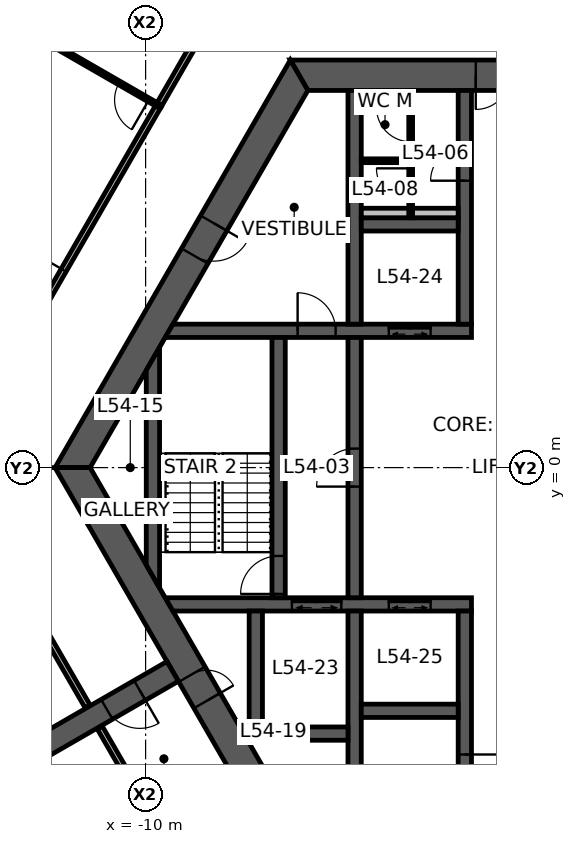
"""IFC4 building model, lengths in metres.
Left out: names, types, materials, properties, quantities, classifications, styles, units other than length and angle.
Written with IfcOpenShell. Run it as: python <this file> out.ifc"""

import sys

from ifc_helpers import new_model, si_unit, direction, frame, frame_2d, origin, place, context, subcontext, project, spatial, polyline, rectangle, outline, extrude, element, fill, save


model = new_model("IFC4")
c1 = context("Model", 3, precision=1e-05, world=origin(), true_north=direction((0.0, 1.0)))
c2 = subcontext(c1, "Body", "Model", "MODEL_VIEW")
j1 = project(units=[si_unit("LENGTHUNIT", "METRE"), si_unit("PLANEANGLEUNIT", "RADIAN")], contexts=[c1])
p1 = place(None, origin())
s1 = spatial("IfcSite", under=j1, at=p1, CompositionType="ELEMENT")
p2 = place(p1, origin())
s2 = spatial("IfcBuilding", under=s1, at=p2, CompositionType="ELEMENT")
p3 = place(p2, frame((0.0, 0.0, 216.7)))
s3 = spatial("IfcBuildingStorey", under=s2, at=p3, CompositionType="ELEMENT", Elevation=216.7)
p4 = place(p3, frame((5.961, 10.325, 0.0), z_axis=(0.0, 0.0, 1.0), x_axis=(-1.0, 0.0, 0.0)))
e1 = element("IfcWall", 1, at=p4, inside=s3, PredefinedType="SHEAR", context=c2, shape_type="SweptSolid", body=[
    extrude(outline(polyline([(-0.231, -0.4), (4.649, -0.4), (5.549, -0.4), (6.374, -0.4), (7.273, -0.4), (12.153, -0.4), (11.691, 0.4), (7.273, 0.4), (6.374, 0.4), (5.549, 0.4), (4.649, 0.4), (0.231, 0.4), (-0.231, -0.4)])), origin(), (0.0, 0.0, 1.0), 3.9),
])
p5 = place(p4, frame((6.374, 0.0, 0.0)))
e2 = element("IfcOpeningElement", 2, at=p5, cuts=e1, PredefinedType="OPENING", context=c2, shape_type="SweptSolid", body=[
    extrude(rectangle(XDim=0.9, YDim=2.1, at=frame_2d((0.45, 1.05))), frame((0.0, 0.41, 0.0), z_axis=(0.0, -1.0, 0.0), x_axis=(1.0, 0.0, 0.0)), (0.0, 0.0, 1.0), 0.82),
])
p6 = place(p4, frame((4.649, 0.0, 0.0)))
e3 = element("IfcOpeningElement", 3, at=p6, cuts=e1, PredefinedType="OPENING", context=c2, shape_type="SweptSolid", body=[
    extrude(rectangle(XDim=0.9, YDim=2.1, at=frame_2d((0.45, 1.05))), frame((0.0, 0.41, 0.0), z_axis=(0.0, -1.0, 0.0), x_axis=(1.0, 0.0, 0.0)), (0.0, 0.0, 1.0), 0.82),
])
p7 = place(p3, frame((-5.961, 10.325, 0.0), z_axis=(0.0, 0.0, 1.0), x_axis=(-0.500004296715, -0.866022923061, 0.0)))
e4 = element("IfcWall", 4, at=p7, inside=s3, PredefinedType="SHEAR", context=c2, shape_type="SweptSolid", body=[
    extrude(outline(polyline([(-0.231, -0.4), (4.494, -0.4), (5.494, -0.4), (12.153, -0.4), (11.691, 0.4), (5.494, 0.4), (4.494, 0.4), (0.231, 0.4), (-0.231, -0.4)])), origin(), (0.0, 0.0, 1.0), 3.9),
])
p8 = place(p7, frame((4.494, 0.0, 0.0)))
e5 = element("IfcOpeningElement", 5, at=p8, cuts=e4, PredefinedType="OPENING", context=c2, shape_type="SweptSolid", body=[
    extrude(rectangle(XDim=1.0, YDim=2.1, at=frame_2d((0.5, 1.05))), frame((0.0, 0.41, 0.0), z_axis=(0.0, -1.0, 0.0), x_axis=(1.0, 0.0, 0.0)), (0.0, 0.0, 1.0), 0.82),
])
p9 = place(p3, frame((-11.922, 0.0, 0.0), z_axis=(0.0, 0.0, 1.0), x_axis=(0.500004296715, -0.866022923061, 0.0)))
e6 = element("IfcWall", 6, at=p9, inside=s3, PredefinedType="SHEAR", context=c2, shape_type="SweptSolid", body=[
    extrude(outline(polyline([(-0.231, -0.4), (6.281, -0.4), (7.081, -0.4), (12.153, -0.4), (11.691, 0.4), (7.081, 0.4), (6.281, 0.4), (0.231, 0.4), (-0.231, -0.4)])), origin(), (0.0, 0.0, 1.0), 3.9),
])
p10 = place(p9, frame((6.281, 0.0, 0.0)))
e7 = element("IfcOpeningElement", 7, at=p10, cuts=e6, PredefinedType="OPENING", context=c2, shape_type="SweptSolid", body=[
    extrude(rectangle(XDim=0.8, YDim=2.1, at=frame_2d((0.4, 1.05))), frame((0.0, 0.41, 0.0), z_axis=(0.0, -1.0, 0.0), x_axis=(1.0, 0.0, 0.0)), (0.0, 0.0, 1.0), 0.82),
])
p11 = place(p3, frame((-9.288, -5.363, 0.0), z_axis=(0.0, 0.0, 1.0), x_axis=(-0.866027473358, -0.499996415376, 0.0)))
e8 = element("IfcWall", 8, at=p11, inside=s3, PredefinedType="SHEAR", context=c2, shape_type="SweptSolid", body=[
    extrude(rectangle(XDim=7.045, YDim=0.6, at=frame_2d((3.523, 0.0))), origin(), (0.0, 0.0, 1.0), 3.9),
])
p12 = place(p11, frame((1.0, 0.0, 0.0)))
e9 = element("IfcOpeningElement", 9, at=p12, cuts=e8, PredefinedType="OPENING", context=c2, shape_type="SweptSolid", body=[
    extrude(rectangle(XDim=1.0, YDim=2.1, at=frame_2d((0.5, 1.05))), frame((0.0, 0.31, 0.0), z_axis=(0.0, -1.0, 0.0), x_axis=(1.0, 0.0, 0.0)), (0.0, 0.0, 1.0), 0.62),
])
p13 = place(p3, frame((-9.382, 3.6, 0.0), z_axis=(0.0, 0.0, 1.0), x_axis=(1.0, 0.0, 0.0)))
e10 = element("IfcWall", 10, at=p13, inside=s3, PredefinedType="SHEAR", context=c2, shape_type="SweptSolid", body=[
    extrude(outline(polyline([(-0.101, -0.175), (3.382, -0.175), (4.382, -0.175), (5.782, -0.175), (6.882, -0.175), (7.957, -0.175), (7.957, 0.175), (6.882, 0.175), (5.782, 0.175), (4.382, 0.175), (3.382, 0.175), (0.101, 0.175), (-0.101, -0.175)])), origin(), (0.0, 0.0, 1.0), 3.9),
])
p14 = place(p13, frame((3.382, 0.0, 0.0)))
e11 = element("IfcOpeningElement", 11, at=p14, cuts=e10, PredefinedType="OPENING", context=c2, shape_type="SweptSolid", body=[
    extrude(rectangle(XDim=1.0, YDim=2.1, at=frame_2d((0.5, 1.05))), frame((0.0, 0.185, 0.0), z_axis=(0.0, -1.0, 0.0), x_axis=(1.0, 0.0, 0.0)), (0.0, 0.0, 1.0), 0.37),
])
p15 = place(p13, frame((5.782, 0.0, 0.0)))
e12 = element("IfcOpeningElement", 12, at=p15, cuts=e10, PredefinedType="OPENING", context=c2, shape_type="SweptSolid", body=[
    extrude(rectangle(XDim=1.1, YDim=2.1, at=frame_2d((0.55, 1.05))), frame((0.0, 0.185, 0.0), z_axis=(0.0, -1.0, 0.0), x_axis=(1.0, 0.0, 0.0)), (0.0, 0.0, 1.0), 0.37),
])
p16 = place(p3, frame((-9.382, -3.6, 0.0), z_axis=(0.0, 0.0, 1.0), x_axis=(1.0, 0.0, 0.0)))
e13 = element("IfcWall", 13, at=p16, inside=s3, PredefinedType="SHEAR", context=c2, shape_type="SweptSolid", body=[
    extrude(outline(polyline([(0.101, -0.175), (3.232, -0.175), (4.532, -0.175), (5.782, -0.175), (6.882, -0.175), (7.957, -0.175), (7.957, 0.175), (6.882, 0.175), (5.782, 0.175), (4.532, 0.175), (3.232, 0.175), (-0.101, 0.175), (0.101, -0.175)])), origin(), (0.0, 0.0, 1.0), 3.9),
])
p17 = place(p16, frame((5.782, 0.0, 0.0)))
e14 = element("IfcOpeningElement", 14, at=p17, cuts=e13, PredefinedType="OPENING", context=c2, shape_type="SweptSolid", body=[
    extrude(rectangle(XDim=1.1, YDim=2.1, at=frame_2d((0.55, 1.05))), frame((0.0, 0.185, 0.0), z_axis=(0.0, -1.0, 0.0), x_axis=(1.0, 0.0, 0.0)), (0.0, 0.0, 1.0), 0.37),
])
p18 = place(p16, frame((3.232, 0.0, 0.0)))
e15 = element("IfcOpeningElement", 15, at=p18, cuts=e13, PredefinedType="OPENING", context=c2, shape_type="SweptSolid", body=[
    extrude(rectangle(XDim=1.3, YDim=2.1, at=frame_2d((0.65, 1.05))), frame((0.0, 0.185, 0.0), z_axis=(0.0, -1.0, 0.0), x_axis=(1.0, 0.0, 0.0)), (0.0, 0.0, 1.0), 0.37),
])
p19 = place(p3, frame((-1.6, 3.775, 0.0), z_axis=(0.0, 0.0, 1.0), x_axis=(0.0, 1.0, 0.0)))
e16 = element("IfcWall", 16, at=p19, inside=s3, PredefinedType="SHEAR", context=c2, shape_type="SweptSolid", body=[
    extrude(rectangle(XDim=6.15, YDim=0.35, at=frame_2d((3.075, 0.0))), origin(), (0.0, 0.0, 1.0), 3.9),
])
p20 = place(p19, frame((3.775, 0.0, 0.0)))
e17 = element("IfcOpeningElement", 17, at=p20, cuts=e16, PredefinedType="OPENING", context=c2, shape_type="SweptSolid", body=[
    extrude(rectangle(XDim=0.9, YDim=2.1, at=frame_2d((0.45, 1.05))), frame((0.0, 0.185, 0.0), z_axis=(0.0, -1.0, 0.0), x_axis=(1.0, 0.0, 0.0)), (0.0, 0.0, 1.0), 0.37),
])
p21 = place(p3, frame((-1.6, -3.775, 0.0), z_axis=(0.0, 0.0, 1.0), x_axis=(0.0, -1.0, 0.0)))
e18 = element("IfcWall", 18, at=p21, inside=s3, PredefinedType="SHEAR", context=c2, shape_type="SweptSolid", body=[
    extrude(rectangle(XDim=6.15, YDim=0.35, at=frame_2d((3.075, 0.0))), origin(), (0.0, 0.0, 1.0), 3.9),
])
p22 = place(p21, frame((3.775, 0.0, 0.0)))
e19 = element("IfcOpeningElement", 19, at=p22, cuts=e18, PredefinedType="OPENING", context=c2, shape_type="SweptSolid", body=[
    extrude(rectangle(XDim=0.9, YDim=2.1, at=frame_2d((0.45, 1.05))), frame((0.0, 0.185, 0.0), z_axis=(0.0, -1.0, 0.0), x_axis=(1.0, 0.0, 0.0)), (0.0, 0.0, 1.0), 0.37),
])
p23 = place(p3, frame((-4.5, -3.425, 0.0), z_axis=(0.0, 0.0, 1.0), x_axis=(0.0, 1.0, 0.0)))
e20 = element("IfcWall", 20, at=p23, inside=s3, PredefinedType="SHEAR", context=c2, shape_type="SweptSolid", body=[
    extrude(rectangle(XDim=6.85, YDim=0.35, at=frame_2d((3.425, 0.0))), origin(), (0.0, 0.0, 1.0), 3.9),
])
p24 = place(p23, frame((2.925, 0.0, 0.0)))
e21 = element("IfcOpeningElement", 21, at=p24, cuts=e20, PredefinedType="OPENING", context=c2, shape_type="SweptSolid", body=[
    extrude(rectangle(XDim=1.0, YDim=2.1, at=frame_2d((0.5, 1.05))), frame((0.0, 0.185, 0.0), z_axis=(0.0, -1.0, 0.0), x_axis=(1.0, 0.0, 0.0)), (0.0, 0.0, 1.0), 0.37),
])
p25 = place(p3, frame((-6.5, -3.425, 0.0), z_axis=(0.0, 0.0, 1.0), x_axis=(0.0, 1.0, 0.0)))
e22 = element("IfcWall", 22, at=p25, inside=s3, PredefinedType="SHEAR", context=c2, shape_type="SweptSolid", body=[
    extrude(rectangle(XDim=6.85, YDim=0.35, at=frame_2d((3.425, 0.0))), origin(), (0.0, 0.0, 1.0), 3.9),
])
p26 = place(p25, frame((0.1, 0.0, 0.0)))
e23 = element("IfcOpeningElement", 23, at=p26, cuts=e22, PredefinedType="OPENING", context=c2, shape_type="SweptSolid", body=[
    extrude(rectangle(XDim=1.0, YDim=2.1, at=frame_2d((0.5, 1.05))), frame((0.0, 0.185, 0.0), z_axis=(0.0, -1.0, 0.0), x_axis=(1.0, 0.0, 0.0)), (0.0, 0.0, 1.0), 0.37),
])
for number, where, z_axis, x_axis in (
    (24, (-4.5, 3.775, 0.0), (0.0, 0.0, 1.0), (0.0, 1.0, 0.0)),
    (25, (-4.5, -3.775, 0.0), (0.0, 0.0, 1.0), (0.0, -1.0, 0.0)),
):
    element("IfcWall", number, at=place(p3, frame(where, z_axis=z_axis, x_axis=x_axis)), inside=s3, PredefinedType="SHEAR", context=c2, shape_type="SweptSolid", body=[
        extrude(rectangle(XDim=6.15, YDim=0.35, at=frame_2d((3.075, 0.0))), origin(), (0.0, 0.0, 1.0), 3.9),
    ])
for number, where, z_axis, x_axis in (
    (26, (-4.325, 6.4, 0.0), (0.0, 0.0, 1.0), (1.0, 0.0, 0.0)),
    (27, (-4.325, -6.4, 0.0), (0.0, 0.0, 1.0), (1.0, 0.0, 0.0)),
):
    element("IfcWall", number, at=place(p3, frame(where, z_axis=z_axis, x_axis=x_axis)), inside=s3, PredefinedType="SHEAR", context=c2, shape_type="SweptSolid", body=[
        extrude(rectangle(XDim=2.55, YDim=0.35, at=frame_2d((1.275, 0.0))), origin(), (0.0, 0.0, 1.0), 3.9),
    ])
p27 = place(p3, frame((-7.275, -7.0, 0.0), z_axis=(0.0, 0.0, 1.0), x_axis=(1.0, 0.0, 0.0)))
e28 = element("IfcWall", 28, at=p27, inside=s3, PredefinedType="SHEAR", context=c2, shape_type="SweptSolid", body=[
    extrude(rectangle(XDim=2.6, YDim=0.35, at=frame_2d((1.3, 0.0))), origin(), (0.0, 0.0, 1.0), 3.9),
])
p28 = place(p3, frame((-7.1, -3.775, 0.0), z_axis=(0.0, 0.0, 1.0), x_axis=(0.0, -1.0, 0.0)))
e29 = element("IfcWall", 29, at=p28, inside=s3, PredefinedType="SHEAR", context=c2, shape_type="SweptSolid", body=[
    extrude(rectangle(XDim=3.05, YDim=0.35, at=frame_2d((1.525, 0.0))), origin(), (0.0, 0.0, 1.0), 3.9),
])
p29 = place(p3, frame((-9.808, -2.862, 0.0), z_axis=(0.0, 0.0, 1.0), x_axis=(0.0, 1.0, 0.0)))
e30 = element("IfcWall", 30, at=p29, inside=s3, PredefinedType="SHEAR", context=c2, shape_type="SweptSolid", body=[
    extrude(outline(polyline([(-0.303, -0.175), (6.028, -0.175), (5.421, 0.175), (0.303, 0.175), (-0.303, -0.175)])), origin(), (0.0, 0.0, 1.0), 3.9),
])
p30 = place(p3, frame((-4.325, 6.7, 0.0), z_axis=(0.0, 0.0, 1.0), x_axis=(1.0, 0.0, 0.0)))
e31 = element("IfcWall", 31, at=p30, inside=s3, PredefinedType="PLUMBINGWALL", context=c2, shape_type="SweptSolid", body=[
    extrude(rectangle(XDim=2.55, YDim=0.25, at=frame_2d((1.275, 0.0))), origin(), (0.0, 0.0, 1.0), 3.9),
])
p31 = place(p3, frame((-3.025, 6.575, 0.0), z_axis=(0.0, 0.0, 1.0), x_axis=(0.0, 1.0, 0.0)))
e32 = element("IfcWall", 32, at=p31, inside=s3, PredefinedType="PARTITIONING", context=c2, shape_type="SweptSolid", body=[
    extrude(rectangle(XDim=3.35, YDim=0.1, at=frame_2d((1.675, 0.0))), origin(), (0.0, 0.0, 1.0), 2.95),
])
p32 = place(p31, frame((2.0, 0.0, 0.0)))
e33 = element("IfcOpeningElement", 33, at=p32, cuts=e32, PredefinedType="OPENING", context=c2, shape_type="SweptSolid", body=[
    extrude(rectangle(XDim=0.9, YDim=2.1, at=frame_2d((0.45, 1.05))), frame((0.0, 0.06, 0.0), z_axis=(0.0, -1.0, 0.0), x_axis=(1.0, 0.0, 0.0)), (0.0, 0.0, 1.0), 0.12),
])
p33 = place(p31, frame((0.4, 0.0, 0.0)))
e34 = element("IfcOpeningElement", 34, at=p33, cuts=e32, PredefinedType="OPENING", context=c2, shape_type="SweptSolid", body=[
    extrude(rectangle(XDim=0.9, YDim=2.1, at=frame_2d((0.45, 1.05))), frame((0.0, 0.06, 0.0), z_axis=(0.0, -1.0, 0.0), x_axis=(1.0, 0.0, 0.0)), (0.0, 0.0, 1.0), 0.12),
])
p34 = place(p3, frame((-3.075, 8.075, 0.0), z_axis=(0.0, 0.0, 1.0), x_axis=(-1.0, 0.0, 0.0)))
e35 = element("IfcWall", 35, at=p34, inside=s3, PredefinedType="PARTITIONING", context=c2, shape_type="SweptSolid", body=[
    extrude(rectangle(XDim=1.25, YDim=0.1, at=frame_2d((0.625, 0.0))), origin(), (0.0, 0.0, 1.0), 2.95),
])
p35 = place(p3, frame((-9.661, 9.516, 0.0), z_axis=(0.0, 0.0, 1.0), x_axis=(0.499997836828, 0.866026652689, 0.0)))
e36 = element("IfcWall", 36, at=p35, inside=s3, PredefinedType="PARTITIONING", context=c2, shape_type="SweptSolid", body=[
    extrude(rectangle(XDim=4.144, YDim=0.15, at=frame_2d((2.072, 0.0))), origin(), (0.0, 0.0, 1.0), 2.95),
])
p36 = place(p3, frame((-11.527, -6.285, 0.0), z_axis=(0.0, 0.0, 1.0), x_axis=(-0.500003537243, 0.866023361547, 0.0)))
e37 = element("IfcWall", 37, at=p36, inside=s3, PredefinedType="PARTITIONING", context=c2, shape_type="SweptSolid", body=[
    extrude(rectangle(XDim=6.516, YDim=0.15, at=frame_2d((3.258, 0.0))), origin(), (0.0, 0.0, 1.0), 2.95),
])
p37 = place(p3, frame((-15.156, 0.0, 0.0), z_axis=(0.0, 0.0, 1.0), x_axis=(0.500006847747, 0.8660214502, 0.0)))
e38 = element("IfcWall", 38, at=p37, inside=s3, PredefinedType="PARTITIONING", context=c2, shape_type="SweptSolid", body=[
    extrude(rectangle(XDim=10.998, YDim=0.15, at=frame_2d((5.499, 0.0))), origin(), (0.0, 0.0, 1.0), 2.95),
])
p38 = place(p37, frame((4.999, 0.0, 0.0)))
e39 = element("IfcOpeningElement", 39, at=p38, cuts=e38, PredefinedType="OPENING", context=c2, shape_type="SweptSolid", body=[
    extrude(rectangle(XDim=1.0, YDim=2.1, at=frame_2d((0.5, 1.05))), frame((0.0, 0.085, 0.0), z_axis=(0.0, -1.0, 0.0), x_axis=(1.0, 0.0, 0.0)), (0.0, 0.0, 1.0), 0.17),
])
p39 = place(p3, frame((-9.656, 9.524, 0.0), z_axis=(0.0, 0.0, 1.0), x_axis=(-0.866526579402, 0.499130931911, 0.0)))
e40 = element("IfcWall", 40, at=p39, inside=s3, PredefinedType="PARTITIONING", context=c2, shape_type="SweptSolid", body=[
    extrude(rectangle(XDim=4.705, YDim=0.1, at=frame_2d((2.353, 0.0))), origin(), (0.0, 0.0, 1.0), 2.95),
])
p40 = place(p39, frame((0.3, 0.0, 0.0)))
e41 = element("IfcOpeningElement", 41, at=p40, cuts=e40, PredefinedType="OPENING", context=c2, shape_type="SweptSolid", body=[
    extrude(rectangle(XDim=0.9, YDim=2.1, at=frame_2d((0.45, 1.05))), frame((0.0, 0.06, 0.0), z_axis=(0.0, -1.0, 0.0), x_axis=(1.0, 0.0, 0.0)), (0.0, 0.0, 1.0), 0.12),
])
p41 = place(p3, frame((-7.589, -13.105, 0.0), z_axis=(0.0, 0.0, 1.0), x_axis=(-0.499986333712, 0.866033293876, 0.0)))
e42 = element("IfcWall", 42, at=p41, inside=s3, PredefinedType="PARTITIONING", context=c2, shape_type="SweptSolid", body=[
    extrude(rectangle(XDim=7.235, YDim=0.15, at=frame_2d((3.617, 0.0))), origin(), (0.0, 0.0, 1.0), 2.95),
])
p42 = place(p41, frame((3.117, 0.0, 0.0)))
e43 = element("IfcOpeningElement", 43, at=p42, cuts=e42, PredefinedType="OPENING", context=c2, shape_type="SweptSolid", body=[
    extrude(rectangle(XDim=1.0, YDim=2.1, at=frame_2d((0.5, 1.05))), frame((0.0, 0.085, 0.0), z_axis=(0.0, -1.0, 0.0), x_axis=(1.0, 0.0, 0.0)), (0.0, 0.0, 1.0), 0.17),
])
p43 = place(p5, origin())
e44 = element("IfcDoor", 44, at=p43, inside=s3, OperationType="SINGLE_SWING_RIGHT", PredefinedType="DOOR", context=c2, shape_type="SweptSolid", body=[
    extrude(rectangle(XDim=0.9, YDim=2.1, at=frame_2d((0.45, 1.05))), frame((0.0, 0.025, 0.0), z_axis=(0.0, -1.0, 0.0), x_axis=(1.0, 0.0, 0.0)), (0.0, 0.0, 1.0), 0.05),
])
fill(e2, e44)
p44 = place(p10, origin())
e45 = element("IfcDoor", 45, at=p44, inside=s3, OperationType="SINGLE_SWING_RIGHT", PredefinedType="DOOR", context=c2, shape_type="SweptSolid", body=[
    extrude(rectangle(XDim=0.8, YDim=2.1, at=frame_2d((0.4, 1.05))), frame((0.0, 0.025, 0.0), z_axis=(0.0, -1.0, 0.0), x_axis=(1.0, 0.0, 0.0)), (0.0, 0.0, 1.0), 0.05),
])
fill(e7, e45)
p45 = place(p8, origin())
e46 = element("IfcDoor", 46, at=p45, inside=s3, OperationType="SINGLE_SWING_LEFT", PredefinedType="DOOR", context=c2, shape_type="SweptSolid", body=[
    extrude(rectangle(XDim=1.0, YDim=2.1, at=frame_2d((0.5, 1.05))), frame((0.0, 0.025, 0.0), z_axis=(0.0, -1.0, 0.0), x_axis=(1.0, 0.0, 0.0)), (0.0, 0.0, 1.0), 0.05),
])
fill(e5, e46)
p46 = place(p24, origin())
e47 = element("IfcDoor", 47, at=p46, inside=s3, OperationType="SINGLE_SWING_LEFT", PredefinedType="DOOR", context=c2, shape_type="SweptSolid", body=[
    extrude(rectangle(XDim=1.0, YDim=2.1, at=frame_2d((0.5, 1.05))), frame((0.0, 0.025, 0.0), z_axis=(0.0, -1.0, 0.0), x_axis=(1.0, 0.0, 0.0)), (0.0, 0.0, 1.0), 0.05),
])
fill(e21, e47)
p47 = place(p26, origin())
e48 = element("IfcDoor", 48, at=p47, inside=s3, OperationType="SINGLE_SWING_LEFT", PredefinedType="DOOR", context=c2, shape_type="SweptSolid", body=[
    extrude(rectangle(XDim=1.0, YDim=2.1, at=frame_2d((0.5, 1.05))), frame((0.0, 0.025, 0.0), z_axis=(0.0, -1.0, 0.0), x_axis=(1.0, 0.0, 0.0)), (0.0, 0.0, 1.0), 0.05),
])
fill(e23, e48)
p48 = place(p14, origin())
e49 = element("IfcDoor", 49, at=p48, inside=s3, OperationType="SINGLE_SWING_LEFT", PredefinedType="DOOR", context=c2, shape_type="SweptSolid", body=[
    extrude(rectangle(XDim=1.0, YDim=2.1, at=frame_2d((0.5, 1.05))), frame((0.0, 0.025, 0.0), z_axis=(0.0, -1.0, 0.0), x_axis=(1.0, 0.0, 0.0)), (0.0, 0.0, 1.0), 0.05),
])
fill(e11, e49)
p49 = place(p20, origin())
e50 = element("IfcDoor", 50, at=p49, inside=s3, OperationType="SINGLE_SWING_LEFT", PredefinedType="DOOR", context=c2, shape_type="SweptSolid", body=[
    extrude(rectangle(XDim=0.9, YDim=2.1, at=frame_2d((0.45, 1.05))), frame((0.0, 0.025, 0.0), z_axis=(0.0, -1.0, 0.0), x_axis=(1.0, 0.0, 0.0)), (0.0, 0.0, 1.0), 0.05),
])
fill(e17, e50)
p50 = place(p22, origin())
e51 = element("IfcDoor", 51, at=p50, inside=s3, OperationType="SINGLE_SWING_LEFT", PredefinedType="DOOR", context=c2, shape_type="SweptSolid", body=[
    extrude(rectangle(XDim=0.9, YDim=2.1, at=frame_2d((0.45, 1.05))), frame((0.0, 0.025, 0.0), z_axis=(0.0, -1.0, 0.0), x_axis=(1.0, 0.0, 0.0)), (0.0, 0.0, 1.0), 0.05),
])
fill(e19, e51)
p51 = place(p12, origin())
e52 = element("IfcDoor", 52, at=p51, inside=s3, OperationType="SINGLE_SWING_LEFT", PredefinedType="DOOR", context=c2, shape_type="SweptSolid", body=[
    extrude(rectangle(XDim=1.0, YDim=2.1, at=frame_2d((0.5, 1.05))), frame((0.0, 0.025, 0.0), z_axis=(0.0, -1.0, 0.0), x_axis=(1.0, 0.0, 0.0)), (0.0, 0.0, 1.0), 0.05),
])
fill(e9, e52)
p52 = place(p32, origin())
e53 = element("IfcDoor", 53, at=p52, inside=s3, OperationType="SINGLE_SWING_RIGHT", PredefinedType="DOOR", context=c2, shape_type="SweptSolid", body=[
    extrude(rectangle(XDim=0.9, YDim=2.1, at=frame_2d((0.45, 1.05))), frame((0.0, 0.025, 0.0), z_axis=(0.0, -1.0, 0.0), x_axis=(1.0, 0.0, 0.0)), (0.0, 0.0, 1.0), 0.05),
])
fill(e33, e53)
p53 = place(p33, origin())
e54 = element("IfcDoor", 54, at=p53, inside=s3, OperationType="SINGLE_SWING_RIGHT", PredefinedType="DOOR", context=c2, shape_type="SweptSolid", body=[
    extrude(rectangle(XDim=0.9, YDim=2.1, at=frame_2d((0.45, 1.05))), frame((0.0, 0.025, 0.0), z_axis=(0.0, -1.0, 0.0), x_axis=(1.0, 0.0, 0.0)), (0.0, 0.0, 1.0), 0.05),
])
fill(e34, e54)
p54 = place(p38, origin())
e55 = element("IfcDoor", 55, at=p54, inside=s3, OperationType="SINGLE_SWING_RIGHT", PredefinedType="DOOR", context=c2, shape_type="SweptSolid", body=[
    extrude(rectangle(XDim=1.0, YDim=2.1, at=frame_2d((0.5, 1.05))), frame((0.0, 0.025, 0.0), z_axis=(0.0, -1.0, 0.0), x_axis=(1.0, 0.0, 0.0)), (0.0, 0.0, 1.0), 0.05),
])
fill(e39, e55)
p55 = place(p40, origin())
e56 = element("IfcDoor", 56, at=p55, inside=s3, OperationType="SINGLE_SWING_LEFT", PredefinedType="DOOR", context=c2, shape_type="SweptSolid", body=[
    extrude(rectangle(XDim=0.9, YDim=2.1, at=frame_2d((0.45, 1.05))), frame((0.0, 0.025, 0.0), z_axis=(0.0, -1.0, 0.0), x_axis=(1.0, 0.0, 0.0)), (0.0, 0.0, 1.0), 0.05),
])
fill(e41, e56)
p56 = place(p15, origin())
e57 = element("IfcDoor", 57, at=p56, inside=s3, OperationType="DOUBLE_DOOR_SLIDING", PredefinedType="DOOR", context=c2, shape_type="SweptSolid", body=[
    extrude(rectangle(XDim=1.1, YDim=2.1, at=frame_2d((0.55, 1.05))), frame((0.0, 0.025, 0.0), z_axis=(0.0, -1.0, 0.0), x_axis=(1.0, 0.0, 0.0)), (0.0, 0.0, 1.0), 0.05),
])
fill(e12, e57)
p57 = place(p17, origin())
e58 = element("IfcDoor", 58, at=p57, inside=s3, OperationType="DOUBLE_DOOR_SLIDING", PredefinedType="DOOR", context=c2, shape_type="SweptSolid", body=[
    extrude(rectangle(XDim=1.1, YDim=2.1, at=frame_2d((0.55, 1.05))), frame((0.0, 0.025, 0.0), z_axis=(0.0, -1.0, 0.0), x_axis=(1.0, 0.0, 0.0)), (0.0, 0.0, 1.0), 0.05),
])
fill(e14, e58)
p58 = place(p18, origin())
e59 = element("IfcDoor", 59, at=p58, inside=s3, OperationType="DOUBLE_DOOR_SLIDING", PredefinedType="DOOR", context=c2, shape_type="SweptSolid", body=[
    extrude(rectangle(XDim=1.3, YDim=2.1, at=frame_2d((0.65, 1.05))), frame((0.0, 0.025, 0.0), z_axis=(0.0, -1.0, 0.0), x_axis=(1.0, 0.0, 0.0)), (0.0, 0.0, 1.0), 0.05),
])
fill(e15, e59)
save(model, sys.argv[1])
